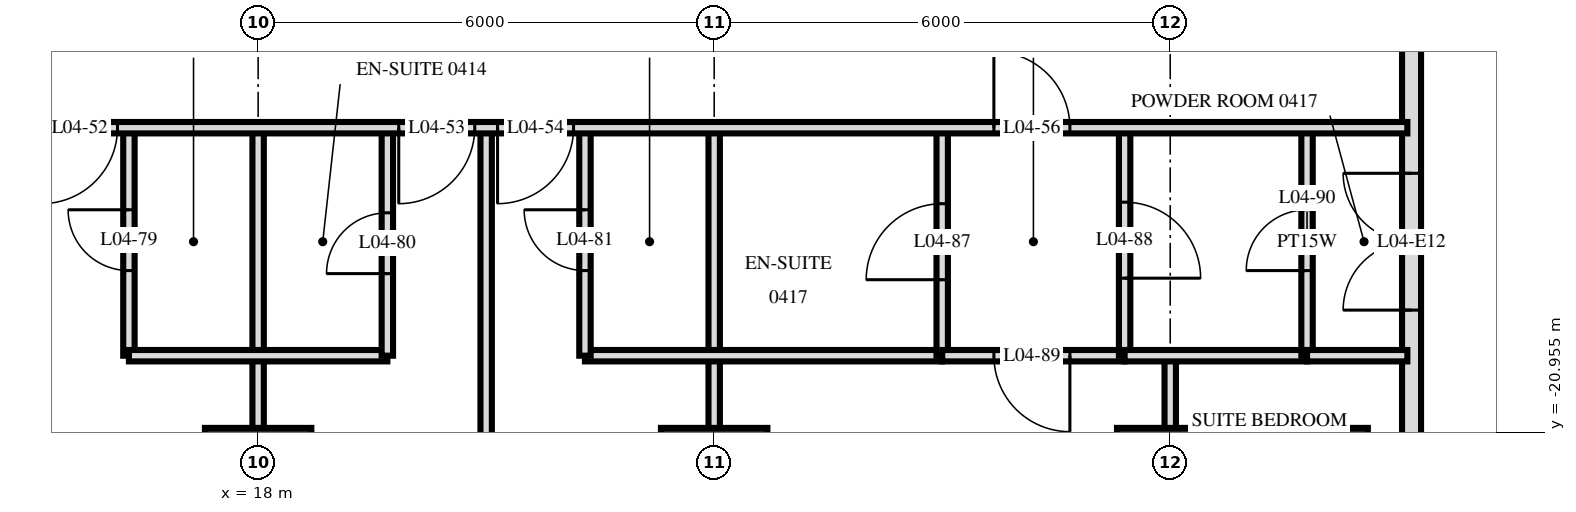
"""IFC4 building model, lengths in metres.
Left out: names, types, materials, properties, quantities, classifications, styles, units other than length and angle.
Written with IfcOpenShell. Run it as: python <this file> out.ifc"""

import sys

from ifc_helpers import new_model, si_unit, direction, frame, frame_2d, origin, origin_2d, place, context, subcontext, project, spatial, rectangle, extrude, element, fill, save


model = new_model("IFC4")
c1 = context("Model", 3, precision=1e-05, world=origin(), true_north=direction((0.0, 1.0)))
c2 = subcontext(c1, "Body", "Model", "MODEL_VIEW")
j1 = project(units=[si_unit("LENGTHUNIT", "METRE"), si_unit("PLANEANGLEUNIT", "RADIAN")], contexts=[c1])
p1 = place(None, origin())
s1 = spatial("IfcSite", under=j1, at=p1, CompositionType="ELEMENT")
p2 = place(p1, origin())
s2 = spatial("IfcBuilding", under=s1, at=p2, CompositionType="ELEMENT")
p3 = place(p2, frame((0.0, 0.0, 24.0)))
s3 = spatial("IfcBuildingStorey", under=s2, at=p3, CompositionType="ELEMENT", Elevation=24.0)
for number, where, z_axis, x_axis in (
    (1, (18.0, -21.6, -0.28), (0.0, 0.0, 1.0), (1.0, 0.0, 0.0)),
    (2, (24.0, -21.6, -0.28), (0.0, 0.0, 1.0), (1.0, 0.0, 0.0)),
    (3, (30.0, -21.6, -0.28), (0.0, 0.0, 1.0), (1.0, 0.0, 0.0)),
):
    element("IfcColumn", number, at=place(p3, frame(where, z_axis=z_axis, x_axis=x_axis)), inside=s3, PredefinedType="COLUMN", context=c2, shape_type="SweptSolid", body=[
        extrude(rectangle(XDim=1.4, YDim=1.4, at=origin_2d()), origin(), (0.0, 0.0, 1.0), 3.88),
    ])
p4 = place(p3, frame((32.1, -21.6, -0.28), z_axis=(0.0, 0.0, 1.0), x_axis=(0.0, 1.0, 0.0)))
e4 = element("IfcColumn", 4, at=p4, inside=s3, PredefinedType="COLUMN", context=c2, shape_type="SweptSolid", body=[
    extrude(rectangle(XDim=1.4, YDim=1.0, at=origin_2d()), origin(), (0.0, 0.0, 1.0), 3.88),
])
p5 = place(p3, frame((33.175, -24.875, 0.0), z_axis=(0.0, 0.0, 1.0), x_axis=(0.0, 1.0, 0.0)))
e5 = element("IfcWall", 5, at=p5, inside=s3, PredefinedType="SOLIDWALL", context=c2, shape_type="SweptSolid", body=[
    extrude(rectangle(XDim=21.551, YDim=0.25, at=frame_2d((10.775, 0.0))), origin(), (0.0, 0.0, 1.0), 3.32),
])
p6 = place(p5, frame((0.575, 0.0, 0.0)))
e6 = element("IfcOpeningElement", 6, at=p6, cuts=e5, PredefinedType="OPENING", context=c2, shape_type="SweptSolid", body=[
    extrude(rectangle(XDim=1.8, YDim=2.4, at=frame_2d((0.9, 1.2))), frame((0.0, 0.135, 0.0), z_axis=(0.0, -1.0, 0.0), x_axis=(1.0, 0.0, 0.0)), (0.0, 0.0, 1.0), 0.27),
])
p7 = place(p5, frame((5.525, 0.0, 0.0)))
e7 = element("IfcOpeningElement", 7, at=p7, cuts=e5, PredefinedType="OPENING", context=c2, shape_type="SweptSolid", body=[
    extrude(rectangle(XDim=1.8, YDim=2.4, at=frame_2d((0.9, 1.2))), frame((0.0, 0.135, 0.0), z_axis=(0.0, -1.0, 0.0), x_axis=(1.0, 0.0, 0.0)), (0.0, 0.0, 1.0), 0.27),
])
p8 = place(p5, frame((12.725, 0.0, 0.0)))
e8 = element("IfcOpeningElement", 8, at=p8, cuts=e5, PredefinedType="OPENING", context=c2, shape_type="SweptSolid", body=[
    extrude(rectangle(XDim=1.8, YDim=2.4, at=frame_2d((0.9, 1.2))), frame((0.0, 0.135, 0.0), z_axis=(0.0, -1.0, 0.0), x_axis=(1.0, 0.0, 0.0)), (0.0, 0.0, 1.0), 0.27),
])
p9 = place(p3, frame((31.8, -19.95, 0.0), z_axis=(0.0, 0.0, 1.0), x_axis=(0.0, 1.0, 0.0)))
e9 = element("IfcWall", 9, at=p9, inside=s3, PredefinedType="PLUMBINGWALL", context=c2, shape_type="SweptSolid", body=[
    extrude(rectangle(XDim=3.0, YDim=0.15, at=frame_2d((1.5, 0.0))), origin(), (0.0, 0.0, 1.0), 3.32),
])
p10 = place(p9, frame((1.12, 0.0, 0.0)))
e10 = element("IfcOpeningElement", 10, at=p10, cuts=e9, PredefinedType="OPENING", context=c2, shape_type="SweptSolid", body=[
    extrude(rectangle(XDim=0.8, YDim=2.1, at=frame_2d((0.4, 1.05))), frame((0.0, 0.085, 0.0), z_axis=(0.0, -1.0, 0.0), x_axis=(1.0, 0.0, 0.0)), (0.0, 0.0, 1.0), 0.17),
])
p11 = place(p3, frame((30.0, -28.978, 0.0), z_axis=(0.0, 0.0, 1.0), x_axis=(0.0, 1.0, 0.0)))
e11 = element("IfcWall", 11, at=p11, inside=s3, PredefinedType="PARTITIONING", context=c2, shape_type="SweptSolid", body=[
    extrude(rectangle(XDim=9.028, YDim=0.15, at=frame_2d((4.514, 0.0))), origin(), (0.0, 0.0, 1.0), 3.32),
])
p12 = place(p11, frame((3.958, 0.0, 0.0)))
e12 = element("IfcOpeningElement", 12, at=p12, cuts=e11, PredefinedType="OPENING", context=c2, shape_type="SweptSolid", body=[
    extrude(rectangle(XDim=0.9, YDim=2.1, at=frame_2d((0.45, 1.05))), frame((0.0, 0.085, 0.0), z_axis=(0.0, -1.0, 0.0), x_axis=(1.0, 0.0, 0.0)), (0.0, 0.0, 1.0), 0.17),
])
p13 = place(p3, frame((29.4, -19.95, 0.0), z_axis=(0.0, 0.0, 1.0), x_axis=(0.0, 1.0, 0.0)))
e13 = element("IfcWall", 13, at=p13, inside=s3, PredefinedType="PARTITIONING", context=c2, shape_type="SweptSolid", body=[
    extrude(rectangle(XDim=3.0, YDim=0.15, at=frame_2d((1.5, 0.0))), origin(), (0.0, 0.0, 1.0), 3.32),
])
p14 = place(p13, frame((1.02, 0.0, 0.0)))
e14 = element("IfcOpeningElement", 14, at=p14, cuts=e13, PredefinedType="OPENING", context=c2, shape_type="SweptSolid", body=[
    extrude(rectangle(XDim=1.0, YDim=2.1, at=frame_2d((0.5, 1.05))), frame((0.0, 0.085, 0.0), z_axis=(0.0, -1.0, 0.0), x_axis=(1.0, 0.0, 0.0)), (0.0, 0.0, 1.0), 0.17),
])
p15 = place(p3, frame((27.0, -19.95, 0.0), z_axis=(0.0, 0.0, 1.0), x_axis=(0.0, 1.0, 0.0)))
e15 = element("IfcWall", 15, at=p15, inside=s3, PredefinedType="PARTITIONING", context=c2, shape_type="SweptSolid", body=[
    extrude(rectangle(XDim=3.0, YDim=0.15, at=frame_2d((1.5, 0.0))), origin(), (0.0, 0.0, 1.0), 3.32),
])
p16 = place(p15, frame((1.0, 0.0, 0.0)))
e16 = element("IfcOpeningElement", 16, at=p16, cuts=e15, PredefinedType="OPENING", context=c2, shape_type="SweptSolid", body=[
    extrude(rectangle(XDim=1.0, YDim=2.1, at=frame_2d((0.5, 1.05))), frame((0.0, 0.085, 0.0), z_axis=(0.0, -1.0, 0.0), x_axis=(1.0, 0.0, 0.0)), (0.0, 0.0, 1.0), 0.17),
])
p17 = place(p3, frame((24.0, -29.22, 0.0), z_axis=(0.0, 0.0, 1.0), x_axis=(0.0, 1.0, 0.0)))
e17 = element("IfcWall", 17, at=p17, inside=s3, PredefinedType="PARTITIONING", context=c2, shape_type="SweptSolid", body=[
    extrude(rectangle(XDim=12.27, YDim=0.15, at=frame_2d((6.135, 0.0))), origin(), (0.0, 0.0, 1.0), 3.32),
])
p18 = place(p3, frame((22.3, -19.95, 0.0), z_axis=(0.0, 0.0, 1.0), x_axis=(0.0, 1.0, 0.0)))
e18 = element("IfcWall", 18, at=p18, inside=s3, PredefinedType="PARTITIONING", context=c2, shape_type="SweptSolid", body=[
    extrude(rectangle(XDim=3.0, YDim=0.15, at=frame_2d((1.5, 0.0))), origin(), (0.0, 0.0, 1.0), 3.32),
])
p19 = place(p18, frame((1.12, 0.0, 0.0)))
e19 = element("IfcOpeningElement", 19, at=p19, cuts=e18, PredefinedType="OPENING", context=c2, shape_type="SweptSolid", body=[
    extrude(rectangle(XDim=0.8, YDim=2.1, at=frame_2d((0.4, 1.05))), frame((0.0, 0.085, 0.0), z_axis=(0.0, -1.0, 0.0), x_axis=(1.0, 0.0, 0.0)), (0.0, 0.0, 1.0), 0.17),
])
p20 = place(p3, frame((21.0, -29.22, 0.0), z_axis=(0.0, 0.0, 1.0), x_axis=(0.0, 1.0, 0.0)))
e20 = element("IfcWall", 20, at=p20, inside=s3, PredefinedType="PARTITIONING", context=c2, shape_type="SweptSolid", body=[
    extrude(rectangle(XDim=12.27, YDim=0.15, at=frame_2d((6.135, 0.0))), origin(), (0.0, 0.0, 1.0), 3.32),
])
p21 = place(p3, frame((19.7, -19.95, 0.0), z_axis=(0.0, 0.0, 1.0), x_axis=(0.0, 1.0, 0.0)))
e21 = element("IfcWall", 21, at=p21, inside=s3, PredefinedType="PARTITIONING", context=c2, shape_type="SweptSolid", body=[
    extrude(rectangle(XDim=3.0, YDim=0.15, at=frame_2d((1.5, 0.0))), origin(), (0.0, 0.0, 1.0), 3.32),
])
p22 = place(p21, frame((1.08, 0.0, 0.0)))
e22 = element("IfcOpeningElement", 22, at=p22, cuts=e21, PredefinedType="OPENING", context=c2, shape_type="SweptSolid", body=[
    extrude(rectangle(XDim=0.8, YDim=2.1, at=frame_2d((0.4, 1.05))), frame((0.0, 0.085, 0.0), z_axis=(0.0, -1.0, 0.0), x_axis=(1.0, 0.0, 0.0)), (0.0, 0.0, 1.0), 0.17),
])
p23 = place(p3, frame((18.0, -29.22, 0.0), z_axis=(0.0, 0.0, 1.0), x_axis=(0.0, 1.0, 0.0)))
e23 = element("IfcWall", 23, at=p23, inside=s3, PredefinedType="PARTITIONING", context=c2, shape_type="SweptSolid", body=[
    extrude(rectangle(XDim=12.27, YDim=0.15, at=frame_2d((6.135, 0.0))), origin(), (0.0, 0.0, 1.0), 3.32),
])
p24 = place(p3, frame((16.3, -19.95, 0.0), z_axis=(0.0, 0.0, 1.0), x_axis=(0.0, 1.0, 0.0)))
e24 = element("IfcWall", 24, at=p24, inside=s3, PredefinedType="PARTITIONING", context=c2, shape_type="SweptSolid", body=[
    extrude(rectangle(XDim=3.0, YDim=0.15, at=frame_2d((1.5, 0.0))), origin(), (0.0, 0.0, 1.0), 3.32),
])
p25 = place(p24, frame((1.12, 0.0, 0.0)))
e25 = element("IfcOpeningElement", 25, at=p25, cuts=e24, PredefinedType="OPENING", context=c2, shape_type="SweptSolid", body=[
    extrude(rectangle(XDim=0.8, YDim=2.1, at=frame_2d((0.4, 1.05))), frame((0.0, 0.085, 0.0), z_axis=(0.0, -1.0, 0.0), x_axis=(1.0, 0.0, 0.0)), (0.0, 0.0, 1.0), 0.17),
])
p26 = place(p3, frame((27.0, -19.95, 0.0), z_axis=(0.0, 0.0, 1.0), x_axis=(1.0, 0.0, 0.0)))
e26 = element("IfcWall", 26, at=p26, inside=s3, PredefinedType="PARTITIONING", context=c2, shape_type="SweptSolid", body=[
    extrude(rectangle(XDim=2.4, YDim=0.15, at=frame_2d((1.2, 0.0))), origin(), (0.0, 0.0, 1.0), 3.32),
])
p27 = place(p26, frame((0.68, 0.0, 0.0)))
e27 = element("IfcOpeningElement", 27, at=p27, cuts=e26, PredefinedType="OPENING", context=c2, shape_type="SweptSolid", body=[
    extrude(rectangle(XDim=1.0, YDim=2.1, at=frame_2d((0.5, 1.05))), frame((0.0, 0.085, 0.0), z_axis=(0.0, -1.0, 0.0), x_axis=(1.0, 0.0, 0.0)), (0.0, 0.0, 1.0), 0.17),
])
p28 = place(p3, frame((16.3, -19.95, 0.0), z_axis=(0.0, 0.0, 1.0), x_axis=(1.0, 0.0, 0.0)))
e28 = element("IfcWall", 28, at=p28, inside=s3, PredefinedType="PARTITIONING", context=c2, shape_type="SweptSolid", body=[
    extrude(rectangle(XDim=3.4, YDim=0.15, at=frame_2d((1.7, 0.0))), origin(), (0.0, 0.0, 1.0), 3.32),
])
p29 = place(p3, frame((22.3, -19.95, 0.0), z_axis=(0.0, 0.0, 1.0), x_axis=(1.0, 0.0, 0.0)))
e29 = element("IfcWall", 29, at=p29, inside=s3, PredefinedType="PARTITIONING", context=c2, shape_type="SweptSolid", body=[
    extrude(rectangle(XDim=4.7, YDim=0.15, at=frame_2d((2.35, 0.0))), origin(), (0.0, 0.0, 1.0), 3.32),
])
p30 = place(p3, frame((29.4, -19.95, 0.0), z_axis=(0.0, 0.0, 1.0), x_axis=(1.0, 0.0, 0.0)))
e30 = element("IfcWall", 30, at=p30, inside=s3, PredefinedType="PARTITIONING", context=c2, shape_type="SweptSolid", body=[
    extrude(rectangle(XDim=2.4, YDim=0.15, at=frame_2d((1.2, 0.0))), origin(), (0.0, 0.0, 1.0), 3.32),
])
p31 = place(p3, frame((31.8, -19.95, 0.0), z_axis=(0.0, 0.0, 1.0), x_axis=(1.0, 0.0, 0.0)))
e31 = element("IfcWall", 31, at=p31, inside=s3, PredefinedType="PLUMBINGWALL", context=c2, shape_type="SweptSolid", body=[
    extrude(rectangle(XDim=1.32, YDim=0.15, at=frame_2d((0.66, 0.0))), origin(), (0.0, 0.0, 1.0), 3.32),
])
p32 = place(p3, frame((-33.12, -16.95, 0.0), z_axis=(0.0, 0.0, 1.0), x_axis=(1.0, 0.0, 0.0)))
e32 = element("IfcWall", 32, at=p32, inside=s3, PredefinedType="PARTITIONING", context=c2, shape_type="SweptSolid", body=[
    extrude(rectangle(XDim=66.24, YDim=0.15, at=frame_2d((33.12, 0.0))), origin(), (0.0, 0.0, 1.0), 3.32),
])
p33 = place(p32, frame((9.27, 0.0, 0.0)))
e33 = element("IfcOpeningElement", 33, at=p33, cuts=e32, PredefinedType="OPENING", context=c2, shape_type="SweptSolid", body=[
    extrude(rectangle(XDim=1.0, YDim=2.1, at=frame_2d((0.5, 1.05))), frame((0.0, 0.085, 0.0), z_axis=(0.0, -1.0, 0.0), x_axis=(1.0, 0.0, 0.0)), (0.0, 0.0, 1.0), 0.17),
])
p34 = place(p32, frame((13.97, 0.0, 0.0)))
e34 = element("IfcOpeningElement", 34, at=p34, cuts=e32, PredefinedType="OPENING", context=c2, shape_type="SweptSolid", body=[
    extrude(rectangle(XDim=1.0, YDim=2.1, at=frame_2d((0.5, 1.05))), frame((0.0, 0.085, 0.0), z_axis=(0.0, -1.0, 0.0), x_axis=(1.0, 0.0, 0.0)), (0.0, 0.0, 1.0), 0.17),
])
p35 = place(p32, frame((15.27, 0.0, 0.0)))
e35 = element("IfcOpeningElement", 35, at=p35, cuts=e32, PredefinedType="OPENING", context=c2, shape_type="SweptSolid", body=[
    extrude(rectangle(XDim=1.0, YDim=2.1, at=frame_2d((0.5, 1.05))), frame((0.0, 0.085, 0.0), z_axis=(0.0, -1.0, 0.0), x_axis=(1.0, 0.0, 0.0)), (0.0, 0.0, 1.0), 0.17),
])
p36 = place(p32, frame((19.97, 0.0, 0.0)))
e36 = element("IfcOpeningElement", 36, at=p36, cuts=e32, PredefinedType="OPENING", context=c2, shape_type="SweptSolid", body=[
    extrude(rectangle(XDim=1.0, YDim=2.1, at=frame_2d((0.5, 1.05))), frame((0.0, 0.085, 0.0), z_axis=(0.0, -1.0, 0.0), x_axis=(1.0, 0.0, 0.0)), (0.0, 0.0, 1.0), 0.17),
])
p37 = place(p32, frame((22.27, 0.0, 0.0)))
e37 = element("IfcOpeningElement", 37, at=p37, cuts=e32, PredefinedType="OPENING", context=c2, shape_type="SweptSolid", body=[
    extrude(rectangle(XDim=1.0, YDim=2.1, at=frame_2d((0.5, 1.05))), frame((0.0, 0.085, 0.0), z_axis=(0.0, -1.0, 0.0), x_axis=(1.0, 0.0, 0.0)), (0.0, 0.0, 1.0), 0.17),
])
p38 = place(p32, frame((28.97, 0.0, 0.0)))
e38 = element("IfcOpeningElement", 38, at=p38, cuts=e32, PredefinedType="OPENING", context=c2, shape_type="SweptSolid", body=[
    extrude(rectangle(XDim=1.0, YDim=2.1, at=frame_2d((0.5, 1.05))), frame((0.0, 0.085, 0.0), z_axis=(0.0, -1.0, 0.0), x_axis=(1.0, 0.0, 0.0)), (0.0, 0.0, 1.0), 0.17),
])
p39 = place(p32, frame((30.27, 0.0, 0.0)))
e39 = element("IfcOpeningElement", 39, at=p39, cuts=e32, PredefinedType="OPENING", context=c2, shape_type="SweptSolid", body=[
    extrude(rectangle(XDim=1.0, YDim=2.1, at=frame_2d((0.5, 1.05))), frame((0.0, 0.085, 0.0), z_axis=(0.0, -1.0, 0.0), x_axis=(1.0, 0.0, 0.0)), (0.0, 0.0, 1.0), 0.17),
])
p40 = place(p32, frame((34.97, 0.0, 0.0)))
e40 = element("IfcOpeningElement", 40, at=p40, cuts=e32, PredefinedType="OPENING", context=c2, shape_type="SweptSolid", body=[
    extrude(rectangle(XDim=1.0, YDim=2.1, at=frame_2d((0.5, 1.05))), frame((0.0, 0.085, 0.0), z_axis=(0.0, -1.0, 0.0), x_axis=(1.0, 0.0, 0.0)), (0.0, 0.0, 1.0), 0.17),
])
p41 = place(p32, frame((36.27, 0.0, 0.0)))
e41 = element("IfcOpeningElement", 41, at=p41, cuts=e32, PredefinedType="OPENING", context=c2, shape_type="SweptSolid", body=[
    extrude(rectangle(XDim=1.0, YDim=2.1, at=frame_2d((0.5, 1.05))), frame((0.0, 0.085, 0.0), z_axis=(0.0, -1.0, 0.0), x_axis=(1.0, 0.0, 0.0)), (0.0, 0.0, 1.0), 0.17),
])
p42 = place(p32, frame((40.97, 0.0, 0.0)))
e42 = element("IfcOpeningElement", 42, at=p42, cuts=e32, PredefinedType="OPENING", context=c2, shape_type="SweptSolid", body=[
    extrude(rectangle(XDim=1.0, YDim=2.1, at=frame_2d((0.5, 1.05))), frame((0.0, 0.085, 0.0), z_axis=(0.0, -1.0, 0.0), x_axis=(1.0, 0.0, 0.0)), (0.0, 0.0, 1.0), 0.17),
])
p43 = place(p32, frame((42.27, 0.0, 0.0)))
e43 = element("IfcOpeningElement", 43, at=p43, cuts=e32, PredefinedType="OPENING", context=c2, shape_type="SweptSolid", body=[
    extrude(rectangle(XDim=1.0, YDim=2.1, at=frame_2d((0.5, 1.05))), frame((0.0, 0.085, 0.0), z_axis=(0.0, -1.0, 0.0), x_axis=(1.0, 0.0, 0.0)), (0.0, 0.0, 1.0), 0.17),
])
p44 = place(p32, frame((46.97, 0.0, 0.0)))
e44 = element("IfcOpeningElement", 44, at=p44, cuts=e32, PredefinedType="OPENING", context=c2, shape_type="SweptSolid", body=[
    extrude(rectangle(XDim=1.0, YDim=2.1, at=frame_2d((0.5, 1.05))), frame((0.0, 0.085, 0.0), z_axis=(0.0, -1.0, 0.0), x_axis=(1.0, 0.0, 0.0)), (0.0, 0.0, 1.0), 0.17),
])
p45 = place(p32, frame((48.27, 0.0, 0.0)))
e45 = element("IfcOpeningElement", 45, at=p45, cuts=e32, PredefinedType="OPENING", context=c2, shape_type="SweptSolid", body=[
    extrude(rectangle(XDim=1.0, YDim=2.1, at=frame_2d((0.5, 1.05))), frame((0.0, 0.085, 0.0), z_axis=(0.0, -1.0, 0.0), x_axis=(1.0, 0.0, 0.0)), (0.0, 0.0, 1.0), 0.17),
])
p46 = place(p32, frame((52.97, 0.0, 0.0)))
e46 = element("IfcOpeningElement", 46, at=p46, cuts=e32, PredefinedType="OPENING", context=c2, shape_type="SweptSolid", body=[
    extrude(rectangle(XDim=1.0, YDim=2.1, at=frame_2d((0.5, 1.05))), frame((0.0, 0.085, 0.0), z_axis=(0.0, -1.0, 0.0), x_axis=(1.0, 0.0, 0.0)), (0.0, 0.0, 1.0), 0.17),
])
p47 = place(p32, frame((54.27, 0.0, 0.0)))
e47 = element("IfcOpeningElement", 47, at=p47, cuts=e32, PredefinedType="OPENING", context=c2, shape_type="SweptSolid", body=[
    extrude(rectangle(XDim=1.0, YDim=2.1, at=frame_2d((0.5, 1.05))), frame((0.0, 0.085, 0.0), z_axis=(0.0, -1.0, 0.0), x_axis=(1.0, 0.0, 0.0)), (0.0, 0.0, 1.0), 0.17),
])
p48 = place(p32, frame((4.4, 0.0, 0.0)))
e48 = element("IfcOpeningElement", 48, at=p48, cuts=e32, PredefinedType="OPENING", context=c2, shape_type="SweptSolid", body=[
    extrude(rectangle(XDim=1.0, YDim=2.1, at=frame_2d((0.5, 1.05))), frame((0.0, 0.085, 0.0), z_axis=(0.0, -1.0, 0.0), x_axis=(1.0, 0.0, 0.0)), (0.0, 0.0, 1.0), 0.17),
])
p49 = place(p32, frame((60.8, 0.0, 0.0)))
e49 = element("IfcOpeningElement", 49, at=p49, cuts=e32, PredefinedType="OPENING", context=c2, shape_type="SweptSolid", body=[
    extrude(rectangle(XDim=1.0, YDim=2.1, at=frame_2d((0.5, 1.05))), frame((0.0, 0.085, 0.0), z_axis=(0.0, -1.0, 0.0), x_axis=(1.0, 0.0, 0.0)), (0.0, 0.0, 1.0), 0.17),
])
p50 = place(p7, origin())
e50 = element("IfcDoor", 50, at=p50, inside=s3, OperationType="DOUBLE_DOOR_SINGLE_SWING", PredefinedType="DOOR", context=c2, shape_type="SweptSolid", body=[
    extrude(rectangle(XDim=1.8, YDim=2.4, at=frame_2d((0.9, 1.2))), frame((0.0, 0.025, 0.0), z_axis=(0.0, -1.0, 0.0), x_axis=(1.0, 0.0, 0.0)), (0.0, 0.0, 1.0), 0.05),
])
fill(e7, e50)
p51 = place(p45, frame((0.5, 0.0, 0.0), z_axis=(0.0, 0.0, 1.0), x_axis=(-1.0, 0.0, 0.0)))
e51 = element("IfcDoor", 51, at=p51, inside=s3, OperationType="SINGLE_SWING_LEFT", PredefinedType="DOOR", context=c2, shape_type="SweptSolid", body=[
    extrude(rectangle(XDim=1.0, YDim=2.1, at=frame_2d((0.0, 1.05))), frame((0.0, -0.025, 0.0), z_axis=(0.0, 1.0, 0.0), x_axis=(-1.0, 0.0, 0.0)), (0.0, 0.0, 1.0), 0.05),
])
fill(e45, e51)
p52 = place(p46, frame((0.5, 0.0, 0.0), z_axis=(0.0, 0.0, 1.0), x_axis=(-1.0, 0.0, 0.0)))
e52 = element("IfcDoor", 52, at=p52, inside=s3, OperationType="SINGLE_SWING_LEFT", PredefinedType="DOOR", context=c2, shape_type="SweptSolid", body=[
    extrude(rectangle(XDim=1.0, YDim=2.1, at=frame_2d((0.0, 1.05))), frame((0.0, -0.025, 0.0), z_axis=(0.0, 1.0, 0.0), x_axis=(-1.0, 0.0, 0.0)), (0.0, 0.0, 1.0), 0.05),
])
fill(e46, e52)
p53 = place(p47, frame((0.5, 0.0, 0.0), z_axis=(0.0, 0.0, 1.0), x_axis=(-1.0, 0.0, 0.0)))
e53 = element("IfcDoor", 53, at=p53, inside=s3, OperationType="SINGLE_SWING_LEFT", PredefinedType="DOOR", context=c2, shape_type="SweptSolid", body=[
    extrude(rectangle(XDim=1.0, YDim=2.1, at=frame_2d((0.0, 1.05))), frame((0.0, -0.025, 0.0), z_axis=(0.0, 1.0, 0.0), x_axis=(-1.0, 0.0, 0.0)), (0.0, 0.0, 1.0), 0.05),
])
fill(e47, e53)
p54 = place(p49, origin())
e54 = element("IfcDoor", 54, at=p54, inside=s3, OperationType="SINGLE_SWING_RIGHT", PredefinedType="DOOR", context=c2, shape_type="SweptSolid", body=[
    extrude(rectangle(XDim=1.0, YDim=2.1, at=frame_2d((0.5, 1.05))), frame((0.0, 0.025, 0.0), z_axis=(0.0, -1.0, 0.0), x_axis=(1.0, 0.0, 0.0)), (0.0, 0.0, 1.0), 0.05),
])
fill(e49, e54)
p55 = place(p25, origin())
e55 = element("IfcDoor", 55, at=p55, inside=s3, OperationType="SINGLE_SWING_LEFT", PredefinedType="DOOR", context=c2, shape_type="SweptSolid", body=[
    extrude(rectangle(XDim=0.8, YDim=2.1, at=frame_2d((0.4, 1.05))), frame((0.0, 0.025, 0.0), z_axis=(0.0, -1.0, 0.0), x_axis=(1.0, 0.0, 0.0)), (0.0, 0.0, 1.0), 0.05),
])
fill(e25, e55)
p56 = place(p22, origin())
e56 = element("IfcDoor", 56, at=p56, inside=s3, OperationType="SINGLE_SWING_RIGHT", PredefinedType="DOOR", context=c2, shape_type="SweptSolid", body=[
    extrude(rectangle(XDim=0.8, YDim=2.1, at=frame_2d((0.4, 1.05))), frame((0.0, 0.025, 0.0), z_axis=(0.0, -1.0, 0.0), x_axis=(1.0, 0.0, 0.0)), (0.0, 0.0, 1.0), 0.05),
])
fill(e22, e56)
p57 = place(p19, origin())
e57 = element("IfcDoor", 57, at=p57, inside=s3, OperationType="SINGLE_SWING_LEFT", PredefinedType="DOOR", context=c2, shape_type="SweptSolid", body=[
    extrude(rectangle(XDim=0.8, YDim=2.1, at=frame_2d((0.4, 1.05))), frame((0.0, 0.025, 0.0), z_axis=(0.0, -1.0, 0.0), x_axis=(1.0, 0.0, 0.0)), (0.0, 0.0, 1.0), 0.05),
])
fill(e19, e57)
p58 = place(p16, origin())
e58 = element("IfcDoor", 58, at=p58, inside=s3, OperationType="SINGLE_SWING_RIGHT", PredefinedType="DOOR", context=c2, shape_type="SweptSolid", body=[
    extrude(rectangle(XDim=1.0, YDim=2.1, at=frame_2d((0.5, 1.05))), frame((0.0, 0.025, 0.0), z_axis=(0.0, -1.0, 0.0), x_axis=(1.0, 0.0, 0.0)), (0.0, 0.0, 1.0), 0.05),
])
fill(e16, e58)
p59 = place(p14, frame((0.5, 0.0, 0.0), z_axis=(0.0, 0.0, 1.0), x_axis=(-1.0, 0.0, 0.0)))
e59 = element("IfcDoor", 59, at=p59, inside=s3, OperationType="SINGLE_SWING_LEFT", PredefinedType="DOOR", context=c2, shape_type="SweptSolid", body=[
    extrude(rectangle(XDim=1.0, YDim=2.1, at=frame_2d((0.0, 1.05))), frame((0.0, -0.025, 0.0), z_axis=(0.0, 1.0, 0.0), x_axis=(-1.0, 0.0, 0.0)), (0.0, 0.0, 1.0), 0.05),
])
fill(e14, e59)
p60 = place(p27, frame((0.5, 0.0, 0.0), z_axis=(0.0, 0.0, 1.0), x_axis=(-1.0, 0.0, 0.0)))
e60 = element("IfcDoor", 60, at=p60, inside=s3, OperationType="SINGLE_SWING_RIGHT", PredefinedType="DOOR", context=c2, shape_type="SweptSolid", body=[
    extrude(rectangle(XDim=1.0, YDim=2.1, at=frame_2d((0.0, 1.05))), frame((0.0, -0.025, 0.0), z_axis=(0.0, 1.0, 0.0), x_axis=(-1.0, 0.0, 0.0)), (0.0, 0.0, 1.0), 0.05),
])
fill(e27, e60)
p61 = place(p10, origin())
e61 = element("IfcDoor", 61, at=p61, inside=s3, OperationType="SINGLE_SWING_RIGHT", PredefinedType="DOOR", context=c2, shape_type="SweptSolid", body=[
    extrude(rectangle(XDim=0.8, YDim=2.1, at=frame_2d((0.4, 1.05))), frame((0.0, 0.025, 0.0), z_axis=(0.0, -1.0, 0.0), x_axis=(1.0, 0.0, 0.0)), (0.0, 0.0, 1.0), 0.05),
])
fill(e10, e61)
save(model, sys.argv[1])
